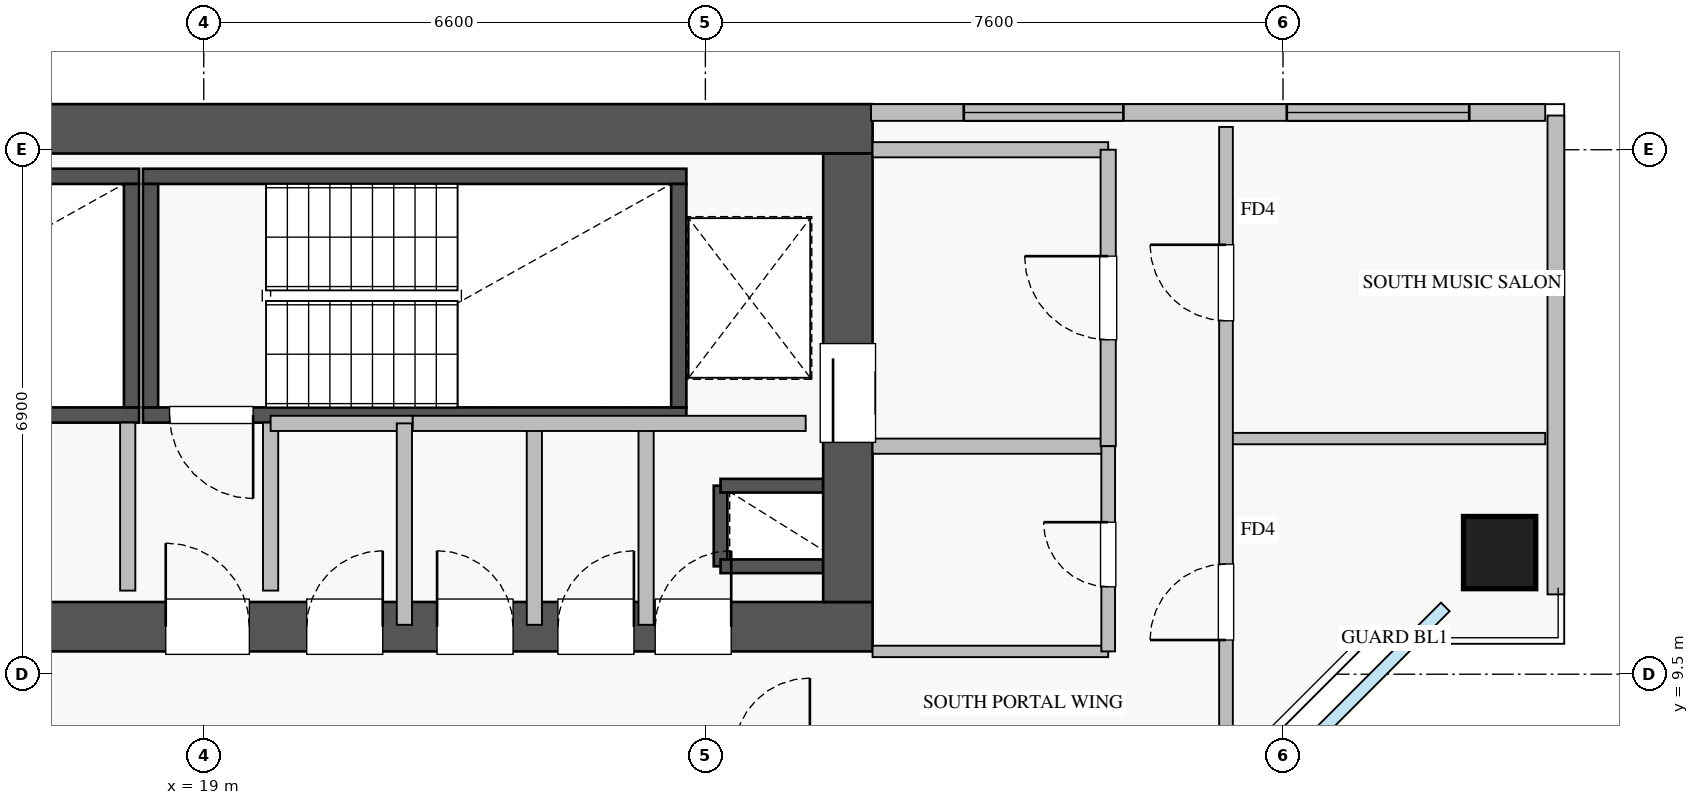
"""IFC4 building model, lengths in metres.
Left out: names, types, materials, properties, quantities, classifications, styles, units other than length and angle.
Written with IfcOpenShell. Run it as: python <this file> out.ifc"""

import sys

from ifc_helpers import new_model, si_unit, direction, frame, frame_2d, origin, origin_2d, place, context, subcontext, project, spatial, rectangle, extrude, source, transform, mapped, element, fill, save


model = new_model("IFC4")
c1 = context("Model", 3, precision=1e-05, world=origin(), true_north=direction((0.0, 1.0)))
c2 = subcontext(c1, "Body", "Model", "MODEL_VIEW")
j1 = project(units=[si_unit("LENGTHUNIT", "METRE"), si_unit("PLANEANGLEUNIT", "RADIAN")], contexts=[c1])
p1 = place(None, origin())
s1 = spatial("IfcSite", under=j1, at=p1, CompositionType="ELEMENT")
p2 = place(p1, origin())
s2 = spatial("IfcBuilding", under=s1, at=p2, CompositionType="ELEMENT")
p3 = place(p2, frame((0.0, 0.0, 163.25)))
s3 = spatial("IfcBuildingStorey", under=s2, at=p3, CompositionType="ELEMENT", Elevation=163.25)
p4 = place(p3, frame((25.8, 10.92, 0.0), z_axis=(0.0, 0.0, 1.0), x_axis=(0.0, 1.0, 0.0)))
e1 = element("IfcWall", 1, at=p4, inside=s3, PredefinedType="SHEAR", context=c2, shape_type="SweptSolid", body=[
    extrude(rectangle(XDim=1.06, YDim=0.18, at=frame_2d((0.53, 0.0))), origin(), (0.0, 0.0, 1.0), 3.07),
])
for number, where, z_axis, x_axis in (
    (2, (25.8, 11.98, 0.0), (0.0, 0.0, 1.0), (1.0, 0.0, 0.0)),
    (3, (25.8, 10.92, 0.0), (0.0, 0.0, 1.0), (1.0, 0.0, 0.0)),
):
    element("IfcWall", number, at=place(p3, frame(where, z_axis=z_axis, x_axis=x_axis)), inside=s3, PredefinedType="SHEAR", context=c2, shape_type="SweptSolid", body=[
        extrude(rectangle(XDim=1.35, YDim=0.18, at=frame_2d((0.675, 0.0))), origin(), (0.0, 0.0, 1.0), 3.07),
    ])
p5 = place(p3, frame((10.85, 12.91, 0.0), z_axis=(0.0, 0.0, 1.0), x_axis=(1.0, 0.0, 0.0)))
e4 = element("IfcWall", 4, at=p5, inside=s3, PredefinedType="SHEAR", context=c2, shape_type="SweptSolid", body=[
    extrude(rectangle(XDim=7.3, YDim=0.2, at=frame_2d((3.65, 0.0))), origin(), (0.0, 0.0, 1.0), 3.25),
])
p6 = place(p5, frame((0.35, 0.0, 0.0)))
e5 = element("IfcOpeningElement", 5, at=p6, cuts=e4, PredefinedType="OPENING", context=c2, shape_type="SweptSolid", body=[
    extrude(rectangle(XDim=1.1, YDim=2.05, at=frame_2d((0.55, 1.025))), frame((0.0, 0.11, 0.0), z_axis=(0.0, -1.0, 0.0), x_axis=(1.0, 0.0, 0.0)), (0.0, 0.0, 1.0), 0.22),
])
p7 = place(p3, frame((10.85, 16.05, 0.0), z_axis=(0.0, 0.0, 1.0), x_axis=(1.0, 0.0, 0.0)))
e6 = element("IfcWall", 6, at=p7, inside=s3, PredefinedType="SHEAR", context=c2, shape_type="SweptSolid", body=[
    extrude(rectangle(XDim=7.3, YDim=0.2, at=frame_2d((3.65, 0.0))), origin(), (0.0, 0.0, 1.0), 3.25),
])
p8 = place(p3, frame((18.05, 13.01, 0.0), z_axis=(0.0, 0.0, 1.0), x_axis=(0.0, 1.0, 0.0)))
e7 = element("IfcWall", 7, at=p8, inside=s3, PredefinedType="SHEAR", context=c2, shape_type="SweptSolid", body=[
    extrude(rectangle(XDim=2.94, YDim=0.2, at=frame_2d((1.47, 0.0))), origin(), (0.0, 0.0, 1.0), 3.25),
])
p9 = place(p3, frame((18.2, 12.91, 0.0), z_axis=(0.0, 0.0, 1.0), x_axis=(1.0, 0.0, 0.0)))
e8 = element("IfcWall", 8, at=p9, inside=s3, PredefinedType="SHEAR", context=c2, shape_type="SweptSolid", body=[
    extrude(rectangle(XDim=7.15, YDim=0.2, at=frame_2d((3.575, 0.0))), origin(), (0.0, 0.0, 1.0), 3.25),
])
p10 = place(p9, frame((0.35, 0.0, 0.0)))
e9 = element("IfcOpeningElement", 9, at=p10, cuts=e8, PredefinedType="OPENING", context=c2, shape_type="SweptSolid", body=[
    extrude(rectangle(XDim=1.1, YDim=2.05, at=frame_2d((0.55, 1.025))), frame((0.0, 0.11, 0.0), z_axis=(0.0, -1.0, 0.0), x_axis=(1.0, 0.0, 0.0)), (0.0, 0.0, 1.0), 0.22),
])
p11 = place(p3, frame((18.2, 16.05, 0.0), z_axis=(0.0, 0.0, 1.0), x_axis=(1.0, 0.0, 0.0)))
e10 = element("IfcWall", 10, at=p11, inside=s3, PredefinedType="SHEAR", context=c2, shape_type="SweptSolid", body=[
    extrude(rectangle(XDim=7.15, YDim=0.2, at=frame_2d((3.575, 0.0))), origin(), (0.0, 0.0, 1.0), 3.25),
])
for number, where, z_axis, x_axis in (
    (11, (18.3, 13.01, 0.0), (0.0, 0.0, 1.0), (0.0, 1.0, 0.0)),
    (12, (25.25, 13.01, 0.0), (0.0, 0.0, 1.0), (0.0, 1.0, 0.0)),
):
    element("IfcWall", number, at=place(p3, frame(where, z_axis=z_axis, x_axis=x_axis)), inside=s3, PredefinedType="SHEAR", context=c2, shape_type="SweptSolid", body=[
        extrude(rectangle(XDim=2.94, YDim=0.2, at=frame_2d((1.47, 0.0))), origin(), (0.0, 0.0, 1.0), 3.25),
    ])
p12 = place(p3, frame((10.2, 10.125, 0.0), z_axis=(0.0, 0.0, 1.0), x_axis=(1.0, 0.0, 0.0)))
e13 = element("IfcWall", 13, at=p12, inside=s3, PredefinedType="SHEAR", context=c2, shape_type="SweptSolid", body=[
    extrude(rectangle(XDim=17.6, YDim=0.65, at=frame_2d((8.8, 0.0))), origin(), (0.0, 0.0, 1.0), 3.25),
])
p13 = place(p12, frame((1.15, 0.0, 0.0)))
e14 = element("IfcOpeningElement", 14, at=p13, cuts=e13, PredefinedType="OPENING", context=c2, shape_type="SweptSolid", body=[
    extrude(rectangle(XDim=1.1, YDim=2.05, at=frame_2d((0.55, 1.025))), frame((0.0, 0.335, 0.0), z_axis=(0.0, -1.0, 0.0), x_axis=(1.0, 0.0, 0.0)), (0.0, 0.0, 1.0), 0.67),
])
p14 = place(p12, frame((8.3, 0.0, 0.0)))
e15 = element("IfcOpeningElement", 15, at=p14, cuts=e13, PredefinedType="OPENING", context=c2, shape_type="SweptSolid", body=[
    extrude(rectangle(XDim=1.1, YDim=2.05, at=frame_2d((0.55, 1.025))), frame((0.0, 0.335, 0.0), z_axis=(0.0, -1.0, 0.0), x_axis=(1.0, 0.0, 0.0)), (0.0, 0.0, 1.0), 0.67),
])
p15 = place(p12, frame((4.9, 0.0, 0.0)))
e16 = element("IfcOpeningElement", 16, at=p15, cuts=e13, PredefinedType="OPENING", context=c2, shape_type="SweptSolid", body=[
    extrude(rectangle(XDim=1.1, YDim=2.05, at=frame_2d((0.55, 1.025))), frame((0.0, 0.335, 0.0), z_axis=(0.0, -1.0, 0.0), x_axis=(1.0, 0.0, 0.0)), (0.0, 0.0, 1.0), 0.67),
])
p16 = place(p12, frame((14.74, 0.0, 0.0)))
e17 = element("IfcOpeningElement", 17, at=p16, cuts=e13, PredefinedType="OPENING", context=c2, shape_type="SweptSolid", body=[
    extrude(rectangle(XDim=1.0, YDim=2.05, at=frame_2d((0.5, 1.025))), frame((0.0, 0.335, 0.0), z_axis=(0.0, -1.0, 0.0), x_axis=(1.0, 0.0, 0.0)), (0.0, 0.0, 1.0), 0.67),
])
p17 = place(p12, frame((10.155, 0.0, 0.0)))
e18 = element("IfcOpeningElement", 18, at=p17, cuts=e13, PredefinedType="OPENING", context=c2, shape_type="SweptSolid", body=[
    extrude(rectangle(XDim=1.0, YDim=2.05, at=frame_2d((0.5, 1.025))), frame((0.0, 0.335, 0.0), z_axis=(0.0, -1.0, 0.0), x_axis=(1.0, 0.0, 0.0)), (0.0, 0.0, 1.0), 0.67),
])
p18 = place(p12, frame((11.87, 0.0, 0.0)))
e19 = element("IfcOpeningElement", 19, at=p18, cuts=e13, PredefinedType="OPENING", context=c2, shape_type="SweptSolid", body=[
    extrude(rectangle(XDim=1.0, YDim=2.05, at=frame_2d((0.5, 1.025))), frame((0.0, 0.335, 0.0), z_axis=(0.0, -1.0, 0.0), x_axis=(1.0, 0.0, 0.0)), (0.0, 0.0, 1.0), 0.67),
])
p19 = place(p12, frame((13.46, 0.0, 0.0)))
e20 = element("IfcOpeningElement", 20, at=p19, cuts=e13, PredefinedType="OPENING", context=c2, shape_type="SweptSolid", body=[
    extrude(rectangle(XDim=1.0, YDim=2.05, at=frame_2d((0.5, 1.025))), frame((0.0, 0.335, 0.0), z_axis=(0.0, -1.0, 0.0), x_axis=(1.0, 0.0, 0.0)), (0.0, 0.0, 1.0), 0.67),
])
p20 = place(p3, frame((10.2, 16.675, 0.0), z_axis=(0.0, 0.0, 1.0), x_axis=(1.0, 0.0, 0.0)))
e21 = element("IfcWall", 21, at=p20, inside=s3, PredefinedType="SHEAR", context=c2, shape_type="SweptSolid", body=[
    extrude(rectangle(XDim=17.6, YDim=0.65, at=frame_2d((8.8, 0.0))), origin(), (0.0, 0.0, 1.0), 3.25),
])
p21 = place(p3, frame((27.475, 10.45, 0.0), z_axis=(0.0, 0.0, 1.0), x_axis=(0.0, 1.0, 0.0)))
e22 = element("IfcWall", 22, at=p21, inside=s3, PredefinedType="SHEAR", context=c2, shape_type="SweptSolid", body=[
    extrude(rectangle(XDim=5.9, YDim=0.65, at=frame_2d((2.95, 0.0))), origin(), (0.0, 0.0, 1.0), 3.25),
])
p22 = place(p21, frame((2.1, 0.0, 0.0)))
e23 = element("IfcOpeningElement", 23, at=p22, cuts=e22, PredefinedType="OPENING", context=c2, shape_type="SweptSolid", body=[
    extrude(rectangle(XDim=1.3, YDim=2.05, at=frame_2d((0.65, 1.025))), frame((0.0, 0.335, 0.0), z_axis=(0.0, -1.0, 0.0), x_axis=(1.0, 0.0, 0.0)), (0.0, 0.0, 1.0), 0.67),
])
m1 = source(origin(), c2, "Body", "SweptSolid", [
    extrude(rectangle(XDim=0.95, YDim=0.95, at=origin_2d()), origin(), (0.0, 0.0, 1.0), 3.25),
])
p23 = place(p3, frame((36.05, 11.1, 0.0), z_axis=(0.0, 0.0, 1.0), x_axis=(1.0, 0.0, 0.0)))
e24 = element("IfcColumn", 24, at=p23, inside=s3, PredefinedType="COLUMN", context=c2, shape_type="MappedRepresentation", body=[
    mapped(m1, transform((0.0, 0.0, 0.0), x_axis=(1.0, 0.0, 0.0), y_axis=(0.0, 1.0, 0.0), z_axis=(0.0, 0.0, 1.0), scale=1.0)),
])
p24 = place(p3, frame((27.78, 16.89, 0.0), z_axis=(0.0, 0.0, 1.0), x_axis=(1.0, 0.0, 0.0)))
e25 = element("IfcWall", 25, at=p24, inside=s3, PredefinedType="STANDARD", context=c2, shape_type="SweptSolid", body=[
    extrude(rectangle(XDim=8.87, YDim=0.22, at=frame_2d((4.435, 0.0))), origin(), (0.0, 0.0, 1.0), 2.61),
])
p25 = place(p24, frame((1.22, 0.0, 0.9)))
e26 = element("IfcOpeningElement", 26, at=p25, cuts=e25, PredefinedType="OPENING", context=c2, shape_type="SweptSolid", body=[
    extrude(rectangle(XDim=2.1, YDim=1.48, at=frame_2d((1.05, 0.74))), frame((0.0, 0.12, 0.0), z_axis=(0.0, -1.0, 0.0), x_axis=(1.0, 0.0, 0.0)), (0.0, 0.0, 1.0), 0.24),
])
p26 = place(p24, frame((5.47, 0.0, 0.9)))
e27 = element("IfcOpeningElement", 27, at=p26, cuts=e25, PredefinedType="OPENING", context=c2, shape_type="SweptSolid", body=[
    extrude(rectangle(XDim=2.4, YDim=1.48, at=frame_2d((1.2, 0.74))), frame((0.0, 0.12, 0.0), z_axis=(0.0, -1.0, 0.0), x_axis=(1.0, 0.0, 0.0)), (0.0, 0.0, 1.0), 0.24),
])
p27 = place(p3, frame((36.79, 10.55, 0.0), z_axis=(0.0, 0.0, 1.0), x_axis=(0.0, 1.0, 0.0)))
e28 = element("IfcWall", 28, at=p27, inside=s3, PredefinedType="STANDARD", context=c2, shape_type="SweptSolid", body=[
    extrude(rectangle(XDim=6.3, YDim=0.22, at=frame_2d((3.15, 0.0))), origin(), (0.0, 0.0, 1.0), 2.61),
])
for number, where, z_axis, x_axis in (
    (29, (27.8, 16.4, 0.0), (0.0, 0.0, 1.0), (1.0, 0.0, 0.0)),
    (30, (27.8, 12.5, 0.0), (0.0, 0.0, 1.0), (1.0, 0.0, 0.0)),
):
    element("IfcWall", number, at=place(p3, frame(where, z_axis=z_axis, x_axis=x_axis)), inside=s3, PredefinedType="PARTITIONING", context=c2, shape_type="SweptSolid", body=[
        extrude(rectangle(XDim=3.1, YDim=0.2, at=frame_2d((1.55, 0.0))), origin(), (0.0, 0.0, 1.0), 3.07),
    ])
p28 = place(p3, frame((30.9, 12.5, 0.0), z_axis=(0.0, 0.0, 1.0), x_axis=(0.0, 1.0, 0.0)))
e31 = element("IfcWall", 31, at=p28, inside=s3, PredefinedType="PARTITIONING", context=c2, shape_type="SweptSolid", body=[
    extrude(rectangle(XDim=3.9, YDim=0.2, at=frame_2d((1.95, 0.0))), origin(), (0.0, 0.0, 1.0), 3.07),
])
p29 = place(p28, frame((1.4, 0.0, 0.0)))
e32 = element("IfcOpeningElement", 32, at=p29, cuts=e31, PredefinedType="OPENING", context=c2, shape_type="SweptSolid", body=[
    extrude(rectangle(XDim=1.1, YDim=2.05, at=frame_2d((0.55, 1.025))), frame((0.0, 0.11, 0.0), z_axis=(0.0, -1.0, 0.0), x_axis=(1.0, 0.0, 0.0)), (0.0, 0.0, 1.0), 0.22),
])
for number, where, z_axis, x_axis in (
    (33, (18.0, 10.6, 0.0), (0.0, 0.0, 1.0), (0.0, 1.0, 0.0)),
    (34, (19.88, 10.6, 0.0), (0.0, 0.0, 1.0), (0.0, 1.0, 0.0)),
):
    element("IfcWall", number, at=place(p3, frame(where, z_axis=z_axis, x_axis=x_axis)), inside=s3, PredefinedType="PARTITIONING", context=c2, shape_type="SweptSolid", body=[
        extrude(rectangle(XDim=2.21, YDim=0.2, at=frame_2d((1.105, 0.0))), origin(), (0.0, 0.0, 1.0), 3.07),
    ])
p30 = place(p3, frame((24.82, 10.15, 0.0), z_axis=(0.0, 0.0, 1.0), x_axis=(0.0, 1.0, 0.0)))
e35 = element("IfcWall", 35, at=p30, inside=s3, PredefinedType="PARTITIONING", context=c2, shape_type="SweptSolid", body=[
    extrude(rectangle(XDim=2.65, YDim=0.2, at=frame_2d((1.325, 0.0))), origin(), (0.0, 0.0, 1.0), 3.07),
])
p31 = place(p3, frame((19.88, 12.8, 0.0), z_axis=(0.0, 0.0, 1.0), x_axis=(1.0, 0.0, 0.0)))
e36 = element("IfcWall", 36, at=p31, inside=s3, PredefinedType="PARTITIONING", context=c2, shape_type="SweptSolid", body=[
    extrude(rectangle(XDim=1.87, YDim=0.2, at=frame_2d((0.935, 0.0))), origin(), (0.0, 0.0, 1.0), 3.07),
])
for number, where, z_axis, x_axis in (
    (37, (21.64, 10.15, 0.0), (0.0, 0.0, 1.0), (0.0, 1.0, 0.0)),
    (38, (23.35, 10.15, 0.0), (0.0, 0.0, 1.0), (0.0, 1.0, 0.0)),
):
    element("IfcWall", number, at=place(p3, frame(where, z_axis=z_axis, x_axis=x_axis)), inside=s3, PredefinedType="PARTITIONING", context=c2, shape_type="SweptSolid", body=[
        extrude(rectangle(XDim=2.65, YDim=0.2, at=frame_2d((1.325, 0.0))), origin(), (0.0, 0.0, 1.0), 3.07),
    ])
p32 = place(p3, frame((21.75, 12.8, 0.0), z_axis=(0.0, 0.0, 1.0), x_axis=(1.0, 0.0, 0.0)))
e39 = element("IfcWall", 39, at=p32, inside=s3, PredefinedType="PARTITIONING", context=c2, shape_type="SweptSolid", body=[
    extrude(rectangle(XDim=5.17, YDim=0.2, at=frame_2d((2.585, 0.0))), origin(), (0.0, 0.0, 1.0), 3.07),
])
p33 = place(p3, frame((27.8, 9.8, 0.0), z_axis=(0.0, 0.0, 1.0), x_axis=(1.0, 0.0, 0.0)))
e40 = element("IfcWall", 40, at=p33, inside=s3, PredefinedType="PARTITIONING", context=c2, shape_type="SweptSolid", body=[
    extrude(rectangle(XDim=3.1, YDim=0.15, at=frame_2d((1.55, 0.0))), origin(), (0.0, 0.0, 1.0), 3.07),
])
p34 = place(p3, frame((30.9, 9.8, 0.0), z_axis=(0.0, 0.0, 1.0), x_axis=(0.0, 1.0, 0.0)))
e41 = element("IfcWall", 41, at=p34, inside=s3, PredefinedType="PARTITIONING", context=c2, shape_type="SweptSolid", body=[
    extrude(rectangle(XDim=2.7, YDim=0.18, at=frame_2d((1.35, 0.0))), origin(), (0.0, 0.0, 1.0), 2.565),
])
p35 = place(p34, frame((0.85, 0.0, 0.0)))
e42 = element("IfcOpeningElement", 42, at=p35, cuts=e41, PredefinedType="OPENING", context=c2, shape_type="SweptSolid", body=[
    extrude(rectangle(XDim=0.85, YDim=2.05, at=frame_2d((0.425, 1.025))), frame((0.0, 0.1, 0.0), z_axis=(0.0, -1.0, 0.0), x_axis=(1.0, 0.0, 0.0)), (0.0, 0.0, 1.0), 0.2),
])
p36 = place(p3, frame((32.45, 12.6, 0.0), z_axis=(0.0, 0.0, 1.0), x_axis=(1.0, 0.0, 0.0)))
e43 = element("IfcWall", 43, at=p36, inside=s3, PredefinedType="PARTITIONING", context=c2, shape_type="SweptSolid", body=[
    extrude(rectangle(XDim=4.2, YDim=0.15, at=frame_2d((2.1, 0.0))), origin(), (0.0, 0.0, 1.0), 3.07),
])
p37 = place(p3, frame((32.45, 5.35, 0.0), z_axis=(0.0, 0.0, 1.0), x_axis=(0.0, 1.0, 0.0)))
e44 = element("IfcWall", 44, at=p37, inside=s3, PredefinedType="PARTITIONING", context=c2, shape_type="SweptSolid", body=[
    extrude(rectangle(XDim=11.35, YDim=0.18, at=frame_2d((5.675, 0.0))), origin(), (0.0, 0.0, 1.0), 3.07),
])
p38 = place(p37, frame((4.6, 0.0, 0.0)))
e45 = element("IfcOpeningElement", 45, at=p38, cuts=e44, PredefinedType="OPENING", context=c2, shape_type="SweptSolid", body=[
    extrude(rectangle(XDim=1.0, YDim=2.05, at=frame_2d((0.5, 1.025))), frame((0.0, 0.1, 0.0), z_axis=(0.0, -1.0, 0.0), x_axis=(1.0, 0.0, 0.0)), (0.0, 0.0, 1.0), 0.2),
])
p39 = place(p37, frame((8.8, 0.0, 0.0)))
e46 = element("IfcOpeningElement", 46, at=p39, cuts=e44, PredefinedType="OPENING", context=c2, shape_type="SweptSolid", body=[
    extrude(rectangle(XDim=1.0, YDim=2.05, at=frame_2d((0.5, 1.025))), frame((0.0, 0.1, 0.0), z_axis=(0.0, -1.0, 0.0), x_axis=(1.0, 0.0, 0.0)), (0.0, 0.0, 1.0), 0.2),
])
m2 = source(origin(), c2, "Body", "SweptSolid", [
    extrude(rectangle(XDim=2.1, YDim=1.48, at=frame_2d((1.05, 0.74))), frame((0.0, 0.03, 0.0), z_axis=(0.0, -1.0, 0.0), x_axis=(1.0, 0.0, 0.0)), (0.0, 0.0, 1.0), 0.06),
])
p40 = place(p25, origin())
e47 = element("IfcWindow", 47, at=p40, inside=s3, PartitioningType="TRIPLE_PANEL_VERTICAL", PredefinedType="WINDOW", context=c2, shape_type="MappedRepresentation", body=[
    mapped(m2, transform((0.0, 0.0, 0.0), x_axis=(1.0, 0.0, 0.0), y_axis=(0.0, 1.0, 0.0), z_axis=(0.0, 0.0, 1.0), scale=1.0)),
])
fill(e26, e47)
m3 = source(origin(), c2, "Body", "SweptSolid", [
    extrude(rectangle(XDim=2.4, YDim=1.48, at=frame_2d((1.2, 0.74))), frame((0.0, 0.03, 0.0), z_axis=(0.0, -1.0, 0.0), x_axis=(1.0, 0.0, 0.0)), (0.0, 0.0, 1.0), 0.06),
])
p41 = place(p26, origin())
e48 = element("IfcWindow", 48, at=p41, inside=s3, PartitioningType="TRIPLE_PANEL_VERTICAL", PredefinedType="WINDOW", context=c2, shape_type="MappedRepresentation", body=[
    mapped(m3, transform((0.0, 0.0, 0.0), x_axis=(1.0, 0.0, 0.0), y_axis=(0.0, 1.0, 0.0), z_axis=(0.0, 0.0, 1.0), scale=1.0)),
])
fill(e27, e48)
m4 = source(origin(), c2, "Body", "SweptSolid", [
    extrude(rectangle(XDim=1.3, YDim=2.05, at=frame_2d((0.65, 1.025))), frame((0.0, 0.025, 0.0), z_axis=(0.0, -1.0, 0.0), x_axis=(1.0, 0.0, 0.0)), (0.0, 0.0, 1.0), 0.05),
])
p42 = place(p22, origin())
e49 = element("IfcDoor", 49, at=p42, inside=s3, OperationType="SLIDING_TO_RIGHT", PredefinedType="DOOR", context=c2, shape_type="MappedRepresentation", body=[
    mapped(m4, transform((0.0, 0.0, 0.0), x_axis=(1.0, 0.0, 0.0), y_axis=(0.0, 1.0, 0.0), z_axis=(0.0, 0.0, 1.0), scale=1.0)),
])
fill(e23, e49)
m5 = source(origin(), c2, "Body", "SweptSolid", [
    extrude(rectangle(XDim=1.1, YDim=2.05, at=frame_2d((0.55, 1.025))), frame((0.0, 0.025, 0.0), z_axis=(0.0, -1.0, 0.0), x_axis=(1.0, 0.0, 0.0)), (0.0, 0.0, 1.0), 0.05),
])
p43 = place(p14, origin())
e50 = element("IfcDoor", 50, at=p43, inside=s3, OperationType="SINGLE_SWING_LEFT", PredefinedType="DOOR", context=c2, shape_type="MappedRepresentation", body=[
    mapped(m5, transform((0.0, 0.0, 0.0), x_axis=(1.0, 0.0, 0.0), y_axis=(0.0, 1.0, 0.0), z_axis=(0.0, 0.0, 1.0), scale=1.0)),
])
fill(e15, e50)
p44 = place(p10, frame((1.1, 0.0, 0.0), z_axis=(0.0, 0.0, 1.0), x_axis=(-1.0, 0.0, 0.0)))
e51 = element("IfcDoor", 51, at=p44, inside=s3, OperationType="SINGLE_SWING_RIGHT", PredefinedType="DOOR", context=c2, shape_type="MappedRepresentation", body=[
    mapped(m5, transform((0.0, 0.0, 0.0), x_axis=(1.0, 0.0, 0.0), y_axis=(0.0, 1.0, 0.0), z_axis=(0.0, 0.0, 1.0), scale=1.0)),
])
fill(e9, e51)
m6 = source(origin(), c2, "Body", "SweptSolid", [
    extrude(rectangle(XDim=1.0, YDim=2.05, at=frame_2d((0.5, 1.025))), frame((0.0, 0.025, 0.0), z_axis=(0.0, -1.0, 0.0), x_axis=(1.0, 0.0, 0.0)), (0.0, 0.0, 1.0), 0.05),
])
p45 = place(p16, origin())
e52 = element("IfcDoor", 52, at=p45, inside=s3, OperationType="SINGLE_SWING_RIGHT", PredefinedType="DOOR", context=c2, shape_type="MappedRepresentation", body=[
    mapped(m6, transform((0.0, 0.0, 0.0), x_axis=(1.0, 0.0, 0.0), y_axis=(0.0, 1.0, 0.0), z_axis=(0.0, 0.0, 1.0), scale=1.0)),
])
fill(e17, e52)
p46 = place(p17, origin())
e53 = element("IfcDoor", 53, at=p46, inside=s3, OperationType="SINGLE_SWING_RIGHT", PredefinedType="DOOR", context=c2, shape_type="MappedRepresentation", body=[
    mapped(m6, transform((0.0, 0.0, 0.0), x_axis=(1.0, 0.0, 0.0), y_axis=(0.0, 1.0, 0.0), z_axis=(0.0, 0.0, 1.0), scale=1.0)),
])
fill(e18, e53)
p47 = place(p18, origin())
e54 = element("IfcDoor", 54, at=p47, inside=s3, OperationType="SINGLE_SWING_LEFT", PredefinedType="DOOR", context=c2, shape_type="MappedRepresentation", body=[
    mapped(m6, transform((0.0, 0.0, 0.0), x_axis=(1.0, 0.0, 0.0), y_axis=(0.0, 1.0, 0.0), z_axis=(0.0, 0.0, 1.0), scale=1.0)),
])
fill(e19, e54)
p48 = place(p19, origin())
e55 = element("IfcDoor", 55, at=p48, inside=s3, OperationType="SINGLE_SWING_RIGHT", PredefinedType="DOOR", context=c2, shape_type="MappedRepresentation", body=[
    mapped(m6, transform((0.0, 0.0, 0.0), x_axis=(1.0, 0.0, 0.0), y_axis=(0.0, 1.0, 0.0), z_axis=(0.0, 0.0, 1.0), scale=1.0)),
])
fill(e20, e55)
p49 = place(p29, origin())
e56 = element("IfcDoor", 56, at=p49, inside=s3, OperationType="SINGLE_SWING_RIGHT", PredefinedType="DOOR", context=c2, shape_type="MappedRepresentation", body=[
    mapped(m5, transform((0.0, 0.0, 0.0), x_axis=(1.0, 0.0, 0.0), y_axis=(0.0, 1.0, 0.0), z_axis=(0.0, 0.0, 1.0), scale=1.0)),
])
fill(e32, e56)
m7 = source(origin(), c2, "Body", "SweptSolid", [
    extrude(rectangle(XDim=0.85, YDim=2.05, at=frame_2d((0.425, 1.025))), frame((0.0, 0.025, 0.0), z_axis=(0.0, -1.0, 0.0), x_axis=(1.0, 0.0, 0.0)), (0.0, 0.0, 1.0), 0.05),
])
p50 = place(p35, origin())
e57 = element("IfcDoor", 57, at=p50, inside=s3, OperationType="SINGLE_SWING_RIGHT", PredefinedType="DOOR", context=c2, shape_type="MappedRepresentation", body=[
    mapped(m7, transform((0.0, 0.0, 0.0), x_axis=(1.0, 0.0, 0.0), y_axis=(0.0, 1.0, 0.0), z_axis=(0.0, 0.0, 1.0), scale=1.0)),
])
fill(e42, e57)
p51 = place(p38, origin())
e58 = element("IfcDoor", 58, at=p51, inside=s3, OperationType="SINGLE_SWING_LEFT", PredefinedType="DOOR", context=c2, shape_type="MappedRepresentation", body=[
    mapped(m6, transform((0.0, 0.0, 0.0), x_axis=(1.0, 0.0, 0.0), y_axis=(0.0, 1.0, 0.0), z_axis=(0.0, 0.0, 1.0), scale=1.0)),
])
fill(e45, e58)
p52 = place(p39, origin())
e59 = element("IfcDoor", 59, at=p52, inside=s3, OperationType="SINGLE_SWING_RIGHT", PredefinedType="DOOR", context=c2, shape_type="MappedRepresentation", body=[
    mapped(m6, transform((0.0, 0.0, 0.0), x_axis=(1.0, 0.0, 0.0), y_axis=(0.0, 1.0, 0.0), z_axis=(0.0, 0.0, 1.0), scale=1.0)),
])
fill(e46, e59)
save(model, sys.argv[1])
